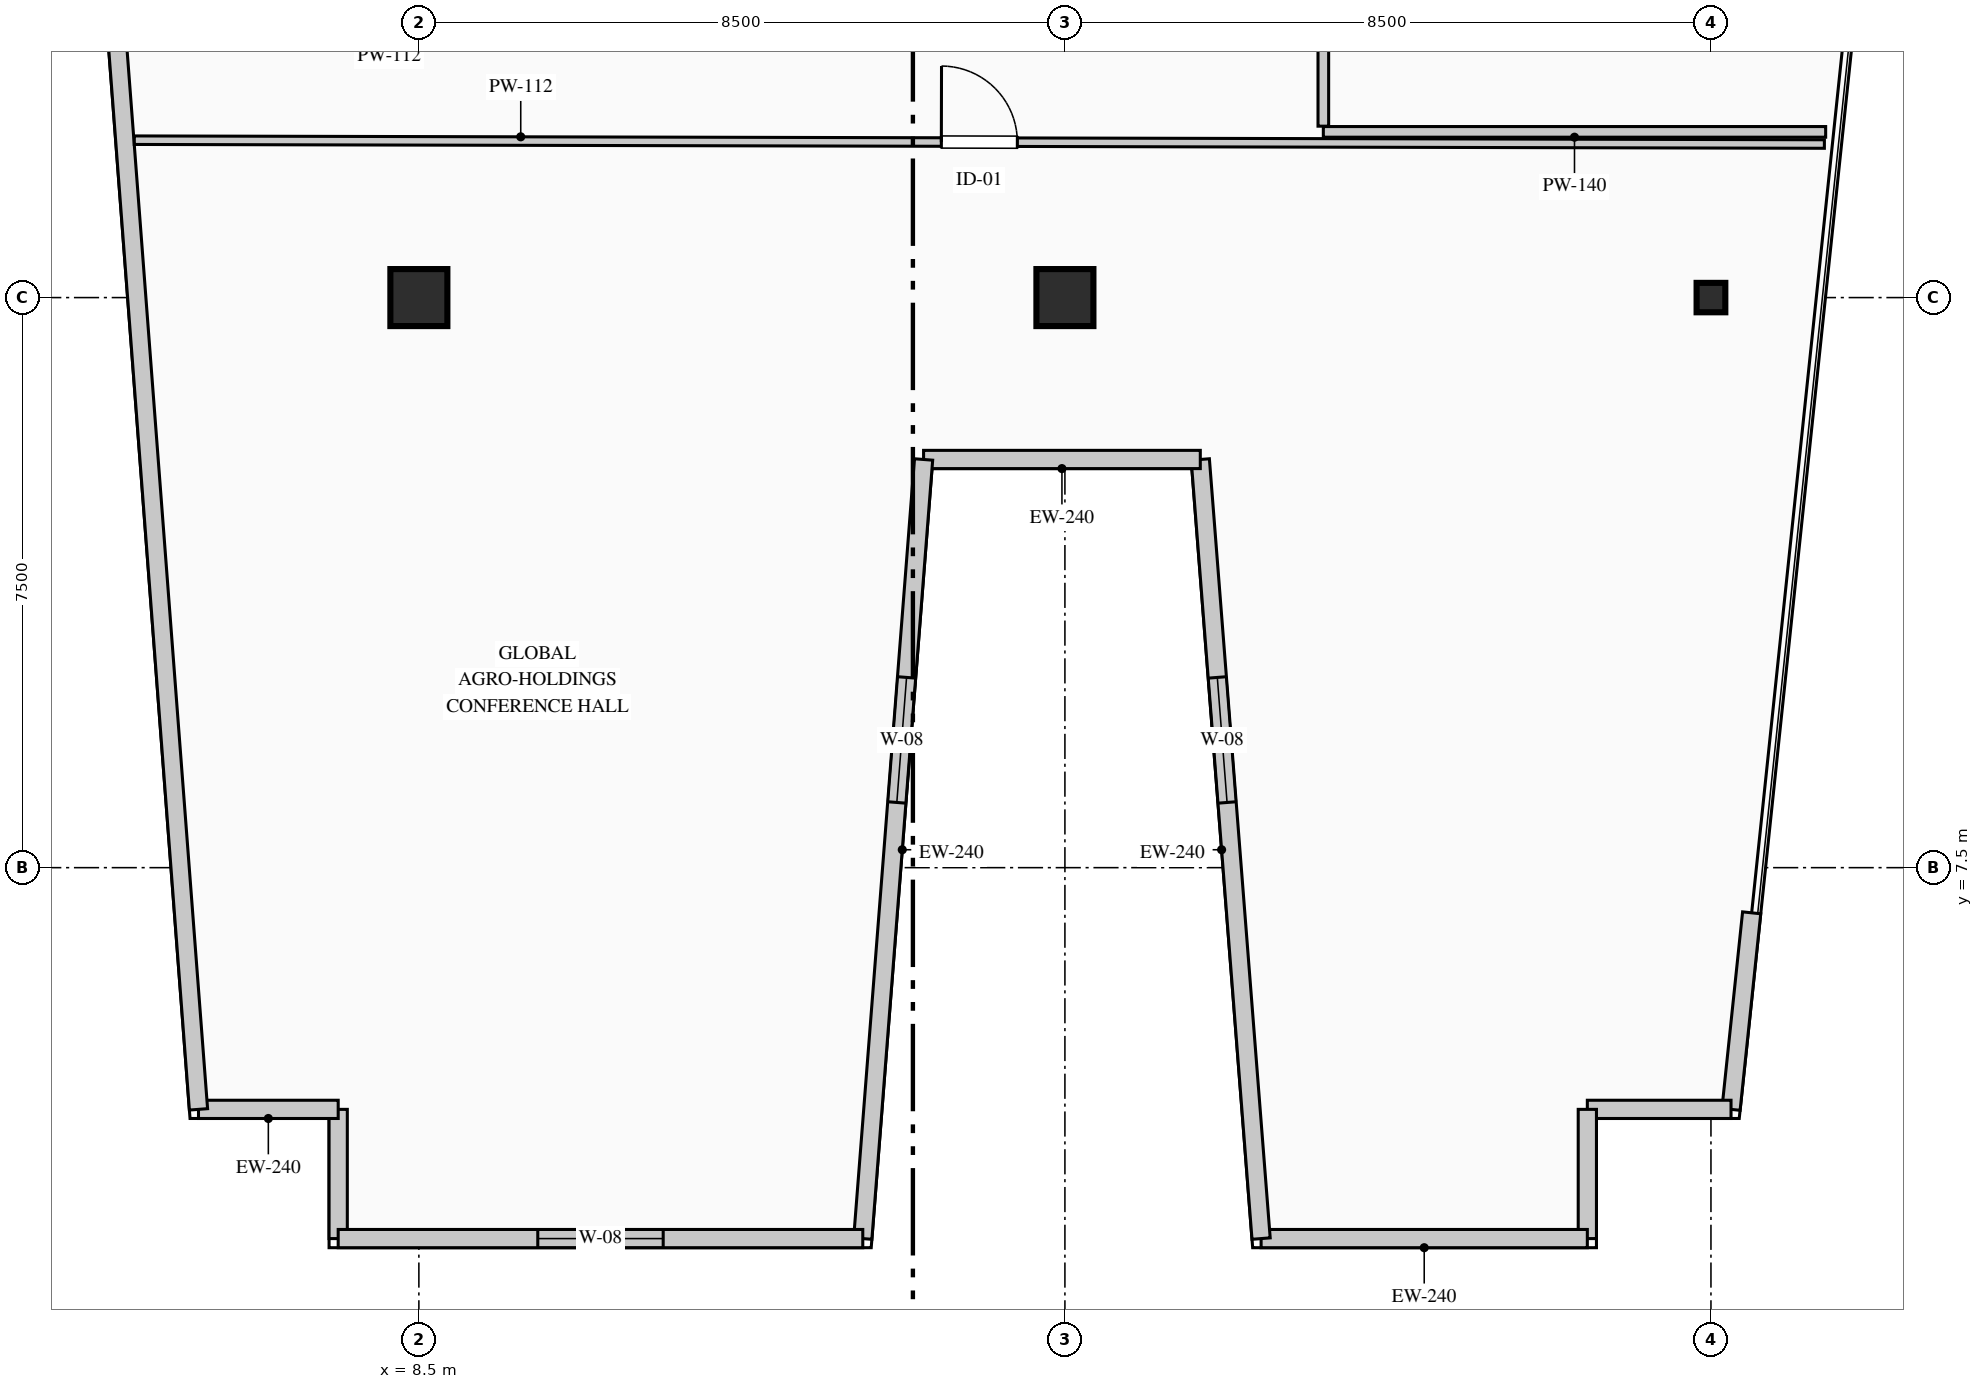
"""IFC4 building model, lengths in metres.
Left out: names, types, materials, properties, quantities, classifications, styles, units other than length and angle.
Written with IfcOpenShell. Run it as: python <this file> out.ifc"""

import sys

from ifc_helpers import new_model, si_unit, direction, frame, frame_2d, origin, origin_2d, place, context, subcontext, project, spatial, rectangle, i_section, extrude, element, fill, save


model = new_model("IFC4")
c1 = context("Model", 3, precision=1e-05, world=origin(), true_north=direction((0.0, 1.0)))
c2 = subcontext(c1, "Body", "Model", "MODEL_VIEW")
j1 = project(units=[si_unit("LENGTHUNIT", "METRE"), si_unit("PLANEANGLEUNIT", "RADIAN")], contexts=[c1])
p1 = place(None, origin())
s1 = spatial("IfcSite", under=j1, at=p1, CompositionType="ELEMENT")
p2 = place(p1, origin())
s2 = spatial("IfcBuilding", under=s1, at=p2, CompositionType="ELEMENT")
p3 = place(p2, frame((0.0, 0.0, 288.3)))
s3 = spatial("IfcBuildingStorey", under=s2, at=p3, CompositionType="ELEMENT", Elevation=288.3)
for number, where, z_axis, x_axis in (
    (1, (8.5, 15.0, 0.0), (0.0, 0.0, 1.0), (1.0, 0.0, 0.0)),
    (2, (17.0, 15.0, 0.0), (0.0, 0.0, 1.0), (1.0, 0.0, 0.0)),
):
    element("IfcColumn", number, at=place(p3, frame(where, z_axis=z_axis, x_axis=x_axis)), inside=s3, PredefinedType="COLUMN", context=c2, shape_type="SweptSolid", body=[
        extrude(rectangle(XDim=0.75, YDim=0.75, at=origin_2d()), origin(), (0.0, 0.0, 1.0), 3.95),
    ])
p4 = place(p3, frame((25.5, 15.0, 0.0), z_axis=(0.0, 0.0, 1.0), x_axis=(1.0, 0.0, 0.0)))
e3 = element("IfcColumn", 3, at=p4, inside=s3, PredefinedType="COLUMN", context=c2, shape_type="SweptSolid", body=[
    extrude(i_section(OverallWidth=0.378, OverallDepth=0.387, WebThickness=0.022, FlangeThickness=0.037, FilletRadius=0.015, at=origin_2d()), origin(), (0.0, 0.0, 1.0), 3.95),
])
p5 = place(p3, frame((7.438, 2.62, 0.0), z_axis=(0.0, 0.0, 1.0), x_axis=(0.0, 1.0, 0.0)))
e4 = element("IfcWall", 4, at=p5, inside=s3, PredefinedType="STANDARD", context=c2, shape_type="SweptSolid", body=[
    extrude(rectangle(XDim=1.7, YDim=0.24, at=frame_2d((0.85, 0.0))), origin(), (0.0, 0.0, 1.0), 3.7),
])
p6 = place(p3, frame((7.438, 4.32, 0.0), z_axis=(0.0, 0.0, 1.0), x_axis=(-1.0, 0.0, 0.0)))
e5 = element("IfcWall", 5, at=p6, inside=s3, PredefinedType="STANDARD", context=c2, shape_type="SweptSolid", body=[
    extrude(rectangle(XDim=1.838, YDim=0.24, at=frame_2d((0.919, 0.0))), origin(), (0.0, 0.0, 1.0), 3.7),
])
p7 = place(p3, frame((5.6, 4.32, 0.0), z_axis=(0.0, 0.0, 1.0), x_axis=(-0.075839920993, 0.997120006009, 0.0)))
e6 = element("IfcWall", 6, at=p7, inside=s3, PredefinedType="STANDARD", context=c2, shape_type="SweptSolid", body=[
    extrude(rectangle(XDim=37.468, YDim=0.24, at=frame_2d((18.734, 0.0))), origin(), (0.0, 0.0, 1.0), 3.7),
])
p8 = place(p7, frame((23.154, 0.0, 0.9)))
e7 = element("IfcOpeningElement", 7, at=p8, cuts=e6, PredefinedType="OPENING", context=c2, shape_type="SweptSolid", body=[
    extrude(rectangle(XDim=1.65, YDim=1.95, at=frame_2d((0.825, 0.975))), frame((0.0, 0.13, 0.0), z_axis=(0.0, -1.0, 0.0), x_axis=(1.0, 0.0, 0.0)), (0.0, 0.0, 1.0), 0.26),
])
p9 = place(p3, frame((26.036, 6.906, 0.0), z_axis=(0.0, 0.0, 1.0), x_axis=(-0.104513699976, -0.994523446942, 0.0)))
e8 = element("IfcWall", 8, at=p9, inside=s3, PredefinedType="STANDARD", context=c2, shape_type="SweptSolid", body=[
    extrude(rectangle(XDim=2.6, YDim=0.24, at=frame_2d((1.3, 0.0))), origin(), (0.0, 0.0, 1.0), 3.7),
])
p10 = place(p3, frame((25.764, 4.32, 0.0), z_axis=(0.0, 0.0, 1.0), x_axis=(-1.0, 0.0, 0.0)))
e9 = element("IfcWall", 9, at=p10, inside=s3, PredefinedType="STANDARD", context=c2, shape_type="SweptSolid", body=[
    extrude(rectangle(XDim=1.89, YDim=0.24, at=frame_2d((0.945, 0.0))), origin(), (0.0, 0.0, 1.0), 3.7),
])
p11 = place(p3, frame((23.874, 4.32, 0.0), z_axis=(0.0, 0.0, 1.0), x_axis=(0.0, -1.0, 0.0)))
e10 = element("IfcWall", 10, at=p11, inside=s3, PredefinedType="STANDARD", context=c2, shape_type="SweptSolid", body=[
    extrude(rectangle(XDim=1.7, YDim=0.24, at=frame_2d((0.85, 0.0))), origin(), (0.0, 0.0, 1.0), 3.7),
])
p12 = place(p3, frame((23.874, 2.62, 0.0), z_axis=(0.0, 0.0, 1.0), x_axis=(-1.0, 0.0, 0.0)))
e11 = element("IfcWall", 11, at=p12, inside=s3, PredefinedType="STANDARD", context=c2, shape_type="SweptSolid", body=[
    extrude(rectangle(XDim=4.292, YDim=0.24, at=frame_2d((2.146, 0.0))), origin(), (0.0, 0.0, 1.0), 3.7),
])
p13 = place(p3, frame((19.581, 2.62, 0.0), z_axis=(0.0, 0.0, 1.0), x_axis=(-0.077816860153, 0.996967670627, 0.0)))
e12 = element("IfcWall", 12, at=p13, inside=s3, PredefinedType="STANDARD", context=c2, shape_type="SweptSolid", body=[
    extrude(rectangle(XDim=10.281, YDim=0.24, at=frame_2d((5.141, 0.0))), origin(), (0.0, 0.0, 1.0), 3.7),
])
p14 = place(p13, frame((5.755, 0.0, 0.9)))
e13 = element("IfcOpeningElement", 13, at=p14, cuts=e12, PredefinedType="OPENING", context=c2, shape_type="SweptSolid", body=[
    extrude(rectangle(XDim=1.65, YDim=1.95, at=frame_2d((0.825, 0.975))), frame((0.0, 0.13, 0.0), z_axis=(0.0, -1.0, 0.0), x_axis=(1.0, 0.0, 0.0)), (0.0, 0.0, 1.0), 0.26),
])
p15 = place(p3, frame((18.781, 12.87, 0.0), z_axis=(0.0, 0.0, 1.0), x_axis=(-1.0, 0.0, 0.0)))
e14 = element("IfcWall", 14, at=p15, inside=s3, PredefinedType="STANDARD", context=c2, shape_type="SweptSolid", body=[
    extrude(rectangle(XDim=3.641, YDim=0.24, at=frame_2d((1.82, 0.0))), origin(), (0.0, 0.0, 1.0), 3.7),
])
p16 = place(p3, frame((15.14, 12.87, 0.0), z_axis=(0.0, 0.0, 1.0), x_axis=(-0.077793257511, -0.996969512616, 0.0)))
e15 = element("IfcWall", 15, at=p16, inside=s3, PredefinedType="STANDARD", context=c2, shape_type="SweptSolid", body=[
    extrude(rectangle(XDim=10.281, YDim=0.24, at=frame_2d((5.141, 0.0))), origin(), (0.0, 0.0, 1.0), 3.7),
])
p17 = place(p16, frame((2.876, 0.0, 0.9)))
e16 = element("IfcOpeningElement", 16, at=p17, cuts=e15, PredefinedType="OPENING", context=c2, shape_type="SweptSolid", body=[
    extrude(rectangle(XDim=1.65, YDim=1.95, at=frame_2d((0.825, 0.975))), frame((0.0, 0.13, 0.0), z_axis=(0.0, -1.0, 0.0), x_axis=(1.0, 0.0, 0.0)), (0.0, 0.0, 1.0), 0.26),
])
p18 = place(p3, frame((14.341, 2.62, 0.0), z_axis=(0.0, 0.0, 1.0), x_axis=(-1.0, 0.0, 0.0)))
e17 = element("IfcWall", 17, at=p18, inside=s3, PredefinedType="STANDARD", context=c2, shape_type="SweptSolid", body=[
    extrude(rectangle(XDim=6.902, YDim=0.24, at=frame_2d((3.451, 0.0))), origin(), (0.0, 0.0, 1.0), 3.7),
])
p19 = place(p18, frame((2.626, 0.0, 0.9)))
e18 = element("IfcOpeningElement", 18, at=p19, cuts=e17, PredefinedType="OPENING", context=c2, shape_type="SweptSolid", body=[
    extrude(rectangle(XDim=1.65, YDim=1.95, at=frame_2d((0.825, 0.975))), frame((0.0, 0.13, 0.0), z_axis=(0.0, -1.0, 0.0), x_axis=(1.0, 0.0, 0.0)), (0.0, 0.0, 1.0), 0.26),
])
p20 = place(p3, frame((27.009, 17.18, 0.0), z_axis=(0.0, 0.0, 1.0), x_axis=(-1.0, 0.0, 0.0)))
e19 = element("IfcWall", 19, at=p20, inside=s3, PredefinedType="PARTITIONING", context=c2, shape_type="SweptSolid", body=[
    extrude(rectangle(XDim=6.609, YDim=0.14, at=frame_2d((3.305, 0.0))), origin(), (0.0, 0.0, 1.0), 3.7),
])
p21 = place(p3, frame((20.4, 17.255, 0.0), z_axis=(0.0, 0.0, 1.0), x_axis=(0.0, 1.0, 0.0)))
e20 = element("IfcWall", 20, at=p21, inside=s3, PredefinedType="PARTITIONING", context=c2, shape_type="SweptSolid", body=[
    extrude(rectangle(XDim=3.995, YDim=0.14, at=frame_2d((1.998, 0.0))), origin(), (0.0, 0.0, 1.0), 3.7),
])
p22 = place(p21, frame((1.522, 0.0, 0.0)))
e21 = element("IfcOpeningElement", 21, at=p22, cuts=e20, PredefinedType="OPENING", context=c2, shape_type="SweptSolid", body=[
    extrude(rectangle(XDim=0.95, YDim=2.15, at=frame_2d((0.475, 1.075))), frame((0.0, 0.08, 0.0), z_axis=(0.0, -1.0, 0.0), x_axis=(1.0, 0.0, 0.0)), (0.0, 0.0, 1.0), 0.16),
])
p23 = place(p3, frame((4.756, 17.071, 0.0), z_axis=(0.0, 0.0, 1.0), x_axis=(0.999997417422, -0.00227269645, 0.0)))
e22 = element("IfcWall", 22, at=p23, inside=s3, PredefinedType="PARTITIONING", context=c2, shape_type="SweptSolid", body=[
    extrude(rectangle(XDim=22.237, YDim=0.112, at=frame_2d((11.118, 0.0))), origin(), (0.0, 0.0, 1.0), 3.7),
])
p24 = place(p23, frame((10.618, 0.0, 0.0)))
e23 = element("IfcOpeningElement", 23, at=p24, cuts=e22, PredefinedType="OPENING", context=c2, shape_type="SweptSolid", body=[
    extrude(rectangle(XDim=1.0, YDim=2.15, at=frame_2d((0.5, 1.075))), frame((0.0, 0.066, 0.0), z_axis=(0.0, -1.0, 0.0), x_axis=(1.0, 0.0, 0.0)), (0.0, 0.0, 1.0), 0.132),
])
p25 = place(p14, origin())
e24 = element("IfcWindow", 24, at=p25, inside=s3, PartitioningType="SINGLE_PANEL", PredefinedType="WINDOW", context=c2, shape_type="SweptSolid", body=[
    extrude(rectangle(XDim=1.65, YDim=1.95, at=frame_2d((0.825, 0.975))), frame((0.0, 0.03, 0.0), z_axis=(0.0, -1.0, 0.0), x_axis=(1.0, 0.0, 0.0)), (0.0, 0.0, 1.0), 0.06),
])
fill(e13, e24)
p26 = place(p17, origin())
e25 = element("IfcWindow", 25, at=p26, inside=s3, PartitioningType="SINGLE_PANEL", PredefinedType="WINDOW", context=c2, shape_type="SweptSolid", body=[
    extrude(rectangle(XDim=1.65, YDim=1.95, at=frame_2d((0.825, 0.975))), frame((0.0, 0.03, 0.0), z_axis=(0.0, -1.0, 0.0), x_axis=(1.0, 0.0, 0.0)), (0.0, 0.0, 1.0), 0.06),
])
fill(e16, e25)
p27 = place(p19, origin())
e26 = element("IfcWindow", 26, at=p27, inside=s3, PartitioningType="SINGLE_PANEL", PredefinedType="WINDOW", context=c2, shape_type="SweptSolid", body=[
    extrude(rectangle(XDim=1.65, YDim=1.95, at=frame_2d((0.825, 0.975))), frame((0.0, 0.03, 0.0), z_axis=(0.0, -1.0, 0.0), x_axis=(1.0, 0.0, 0.0)), (0.0, 0.0, 1.0), 0.06),
])
fill(e18, e26)
p28 = place(p24, origin())
e27 = element("IfcDoor", 27, at=p28, inside=s3, OperationType="SINGLE_SWING_LEFT", PredefinedType="DOOR", context=c2, shape_type="SweptSolid", body=[
    extrude(rectangle(XDim=1.0, YDim=2.15, at=frame_2d((0.5, 1.075))), frame((0.0, 0.025, 0.0), z_axis=(0.0, -1.0, 0.0), x_axis=(1.0, 0.0, 0.0)), (0.0, 0.0, 1.0), 0.05),
])
fill(e23, e27)
save(model, sys.argv[1])
